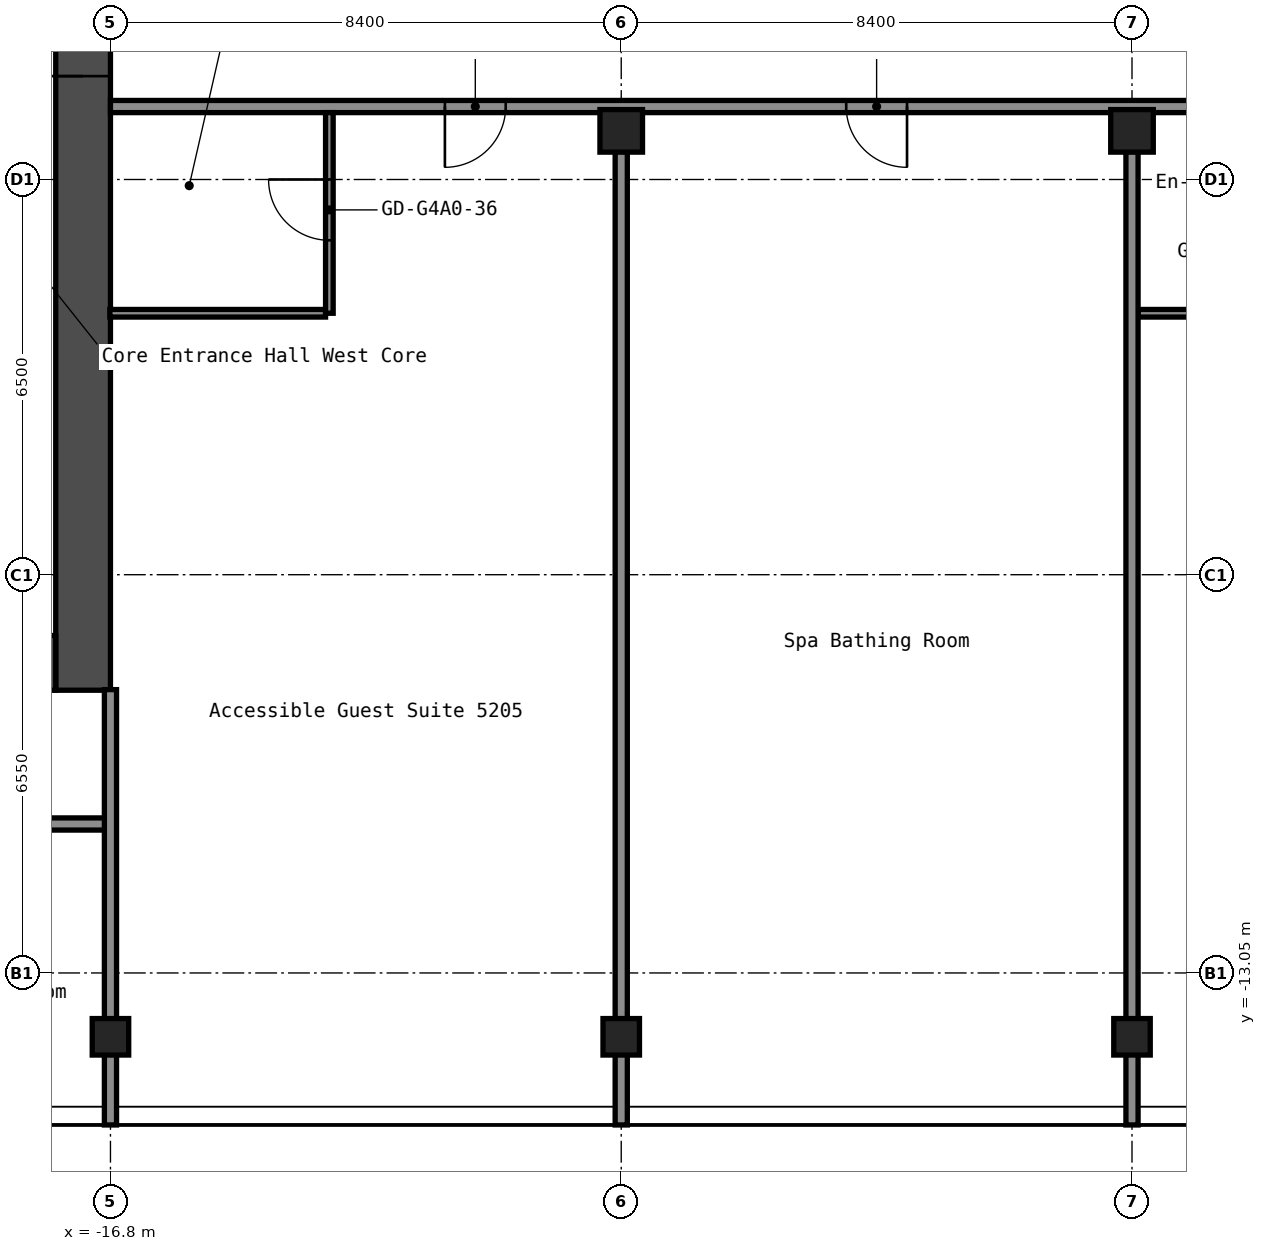
"""IFC4 building model, lengths in metres.
Left out: names, types, materials, properties, quantities, classifications, styles, units other than length and angle.
Written with IfcOpenShell. Run it as: python <this file> out.ifc"""

import sys

from ifc_helpers import new_model, si_unit, direction, frame, frame_2d, origin, origin_2d, place, context, subcontext, project, spatial, rectangle, hollow_rectangle, extrude, element, fill, save


model = new_model("IFC4")
c1 = context("Model", 3, precision=1e-05, world=origin(), true_north=direction((0.0, 1.0)))
c2 = subcontext(c1, "Body", "Model", "MODEL_VIEW")
j1 = project(units=[si_unit("LENGTHUNIT", "METRE"), si_unit("PLANEANGLEUNIT", "RADIAN")], contexts=[c1])
p1 = place(None, origin())
s1 = spatial("IfcSite", under=j1, at=p1, CompositionType="ELEMENT")
p2 = place(p1, origin())
s2 = spatial("IfcBuilding", under=s1, at=p2, CompositionType="ELEMENT")
p3 = place(p2, frame((0.0, 0.0, 186.6)))
s3 = spatial("IfcBuildingStorey", under=s2, at=p3, CompositionType="ELEMENT", Elevation=186.6)
for number, where, z_axis, x_axis in (
    (1, (-16.8, -14.1, 0.0), (0.0, 0.0, 1.0), (1.0, 0.0, 0.0)),
    (2, (-8.4, -14.1, 0.0), (0.0, 0.0, 1.0), (1.0, 0.0, 0.0)),
):
    element("IfcColumn", number, at=place(p3, frame(where, z_axis=z_axis, x_axis=x_axis)), inside=s3, PredefinedType="COLUMN", context=c2, shape_type="SweptSolid", body=[
        extrude(hollow_rectangle(XDim=0.6, YDim=0.6, WallThickness=0.025, InnerFilletRadius=0.038, OuterFilletRadius=0.062, at=origin_2d()), origin(), (0.0, 0.0, 1.0), 2.75),
    ])
p4 = place(p3, frame((-8.4, 0.8, 0.0), z_axis=(0.0, 0.0, 1.0), x_axis=(1.0, 0.0, 0.0)))
e3 = element("IfcColumn", 3, at=p4, inside=s3, PredefinedType="COLUMN", context=c2, shape_type="SweptSolid", body=[
    extrude(hollow_rectangle(XDim=0.7, YDim=0.7, WallThickness=0.028, at=origin_2d()), origin(), (0.0, 0.0, 1.0), 2.75),
])
p5 = place(p3, frame((0.0, -14.1, 0.0), z_axis=(0.0, 0.0, 1.0), x_axis=(1.0, 0.0, 0.0)))
e4 = element("IfcColumn", 4, at=p5, inside=s3, PredefinedType="COLUMN", context=c2, shape_type="SweptSolid", body=[
    extrude(hollow_rectangle(XDim=0.6, YDim=0.6, WallThickness=0.025, InnerFilletRadius=0.038, OuterFilletRadius=0.062, at=origin_2d()), origin(), (0.0, 0.0, 1.0), 2.75),
])
p6 = place(p3, frame((0.0, 0.8, 0.0), z_axis=(0.0, 0.0, 1.0), x_axis=(1.0, 0.0, 0.0)))
e5 = element("IfcColumn", 5, at=p6, inside=s3, PredefinedType="COLUMN", context=c2, shape_type="SweptSolid", body=[
    extrude(hollow_rectangle(XDim=0.7, YDim=0.7, WallThickness=0.028, at=origin_2d()), origin(), (0.0, 0.0, 1.0), 2.75),
])
p7 = place(p3, frame((-17.25, -8.4, 0.0), z_axis=(0.0, 0.0, 1.0), x_axis=(0.0, 1.0, 0.0)))
e6 = element("IfcWall", 6, at=p7, inside=s3, PredefinedType="SHEAR", context=c2, shape_type="SweptSolid", body=[
    extrude(rectangle(XDim=16.8, YDim=0.9, at=frame_2d((8.4, 0.0))), origin(), (0.0, 0.0, 1.0), 2.75),
])
p8 = place(p7, frame((10.1, 0.0, 0.0)))
e7 = element("IfcOpeningElement", 7, at=p8, cuts=e6, PredefinedType="OPENING", context=c2, shape_type="SweptSolid", body=[
    extrude(rectangle(XDim=1.6, YDim=2.1, at=frame_2d((0.8, 1.05))), frame((0.0, 0.46, 0.0), z_axis=(0.0, -1.0, 0.0), x_axis=(1.0, 0.0, 0.0)), (0.0, 0.0, 1.0), 0.92),
])
p9 = place(p3, frame((-32.7, -7.95, 0.0), z_axis=(0.0, 0.0, 1.0), x_axis=(1.0, 0.0, 0.0)))
e8 = element("IfcWall", 8, at=p9, inside=s3, PredefinedType="SHEAR", context=c2, shape_type="SweptSolid", body=[
    extrude(rectangle(XDim=15.0, YDim=0.9, at=frame_2d((7.5, 0.0))), origin(), (0.0, 0.0, 1.0), 2.75),
])
p10 = place(p9, frame((11.45, 0.0, 0.0)))
e9 = element("IfcOpeningElement", 9, at=p10, cuts=e8, PredefinedType="OPENING", context=c2, shape_type="SweptSolid", body=[
    extrude(rectangle(XDim=1.0, YDim=2.1, at=frame_2d((0.5, 1.05))), frame((0.0, 0.46, 0.0), z_axis=(0.0, -1.0, 0.0), x_axis=(1.0, 0.0, 0.0)), (0.0, 0.0, 1.0), 0.92),
])
p11 = place(p3, frame((-38.1, -10.6, 0.0), z_axis=(0.0, 0.0, 1.0), x_axis=(1.0, 0.0, 0.0)))
e10 = element("IfcWall", 10, at=p11, inside=s3, PredefinedType="PARTITIONING", context=c2, shape_type="SweptSolid", body=[
    extrude(rectangle(XDim=21.3, YDim=0.2, at=frame_2d((10.65, 0.0))), origin(), (0.0, 0.0, 1.0), 2.75),
])
p12 = place(p11, frame((1.95, 0.0, 0.0)))
e11 = element("IfcOpeningElement", 11, at=p12, cuts=e10, PredefinedType="OPENING", context=c2, shape_type="SweptSolid", body=[
    extrude(rectangle(XDim=0.9, YDim=2.1, at=frame_2d((0.45, 1.05))), frame((0.0, 0.11, 0.0), z_axis=(0.0, -1.0, 0.0), x_axis=(1.0, 0.0, 0.0)), (0.0, 0.0, 1.0), 0.22),
])
p13 = place(p11, frame((6.74, 0.0, 0.0)))
e12 = element("IfcOpeningElement", 12, at=p13, cuts=e10, PredefinedType="OPENING", context=c2, shape_type="SweptSolid", body=[
    extrude(rectangle(XDim=0.9, YDim=2.1, at=frame_2d((0.45, 1.05))), frame((0.0, 0.11, 0.0), z_axis=(0.0, -1.0, 0.0), x_axis=(1.0, 0.0, 0.0)), (0.0, 0.0, 1.0), 0.22),
])
p14 = place(p11, frame((10.94, 0.0, 0.0)))
e13 = element("IfcOpeningElement", 13, at=p14, cuts=e10, PredefinedType="OPENING", context=c2, shape_type="SweptSolid", body=[
    extrude(rectangle(XDim=0.9, YDim=2.1, at=frame_2d((0.45, 1.05))), frame((0.0, 0.11, 0.0), z_axis=(0.0, -1.0, 0.0), x_axis=(1.0, 0.0, 0.0)), (0.0, 0.0, 1.0), 0.22),
])
p15 = place(p11, frame((13.96, 0.0, 0.0)))
e14 = element("IfcOpeningElement", 14, at=p15, cuts=e10, PredefinedType="OPENING", context=c2, shape_type="SweptSolid", body=[
    extrude(rectangle(XDim=0.9, YDim=2.1, at=frame_2d((0.45, 1.05))), frame((0.0, 0.11, 0.0), z_axis=(0.0, -1.0, 0.0), x_axis=(1.0, 0.0, 0.0)), (0.0, 0.0, 1.0), 0.22),
])
p16 = place(p11, frame((18.16, 0.0, 0.0)))
e15 = element("IfcOpeningElement", 15, at=p16, cuts=e10, PredefinedType="OPENING", context=c2, shape_type="SweptSolid", body=[
    extrude(rectangle(XDim=0.9, YDim=2.1, at=frame_2d((0.45, 1.05))), frame((0.0, 0.11, 0.0), z_axis=(0.0, -1.0, 0.0), x_axis=(1.0, 0.0, 0.0)), (0.0, 0.0, 1.0), 0.22),
])
p17 = place(p3, frame((-16.81, -2.2, 0.0), z_axis=(0.0, 0.0, 1.0), x_axis=(1.0, 0.0, 0.0)))
e16 = element("IfcWall", 16, at=p17, inside=s3, PredefinedType="PARTITIONING", context=c2, shape_type="SweptSolid", body=[
    extrude(rectangle(XDim=3.548, YDim=0.125, at=frame_2d((1.774, 0.0))), origin(), (0.0, 0.0, 1.0), 2.75),
])
p18 = place(p3, frame((0.1, -2.2, 0.0), z_axis=(0.0, 0.0, 1.0), x_axis=(1.0, 0.0, 0.0)))
e17 = element("IfcWall", 17, at=p18, inside=s3, PredefinedType="PARTITIONING", context=c2, shape_type="SweptSolid", body=[
    extrude(rectangle(XDim=3.237, YDim=0.125, at=frame_2d((1.619, 0.0))), origin(), (0.0, 0.0, 1.0), 2.75),
])
p19 = place(p18, frame((1.2, 0.0, 0.0)))
e18 = element("IfcOpeningElement", 18, at=p19, cuts=e17, PredefinedType="OPENING", context=c2, shape_type="SweptSolid", body=[
    extrude(rectangle(XDim=0.8, YDim=2.1, at=frame_2d((0.4, 1.05))), frame((0.0, 0.073, 0.0), z_axis=(0.0, -1.0, 0.0), x_axis=(1.0, 0.0, 0.0)), (0.0, 0.0, 1.0), 0.145),
])
p20 = place(p3, frame((-16.8, 1.2, 0.0), z_axis=(0.0, 0.0, 1.0), x_axis=(1.0, 0.0, 0.0)))
e19 = element("IfcWall", 19, at=p20, inside=s3, PredefinedType="PARTITIONING", context=c2, shape_type="SweptSolid", body=[
    extrude(rectangle(XDim=33.6, YDim=0.2, at=frame_2d((16.8, 0.0))), origin(), (0.0, 0.0, 1.0), 2.75),
])
p21 = place(p20, frame((5.5, 0.0, 0.0)))
e20 = element("IfcOpeningElement", 20, at=p21, cuts=e19, PredefinedType="OPENING", context=c2, shape_type="SweptSolid", body=[
    extrude(rectangle(XDim=1.0, YDim=2.1, at=frame_2d((0.5, 1.05))), frame((0.0, 0.11, 0.0), z_axis=(0.0, -1.0, 0.0), x_axis=(1.0, 0.0, 0.0)), (0.0, 0.0, 1.0), 0.22),
])
p22 = place(p20, frame((12.1, 0.0, 0.0)))
e21 = element("IfcOpeningElement", 21, at=p22, cuts=e19, PredefinedType="OPENING", context=c2, shape_type="SweptSolid", body=[
    extrude(rectangle(XDim=1.0, YDim=2.1, at=frame_2d((0.5, 1.05))), frame((0.0, 0.11, 0.0), z_axis=(0.0, -1.0, 0.0), x_axis=(1.0, 0.0, 0.0)), (0.0, 0.0, 1.0), 0.22),
])
p23 = place(p20, frame((22.2, 0.0, 0.0)))
e22 = element("IfcOpeningElement", 22, at=p23, cuts=e19, PredefinedType="OPENING", context=c2, shape_type="SweptSolid", body=[
    extrude(rectangle(XDim=1.0, YDim=2.1, at=frame_2d((0.5, 1.05))), frame((0.0, 0.11, 0.0), z_axis=(0.0, -1.0, 0.0), x_axis=(1.0, 0.0, 0.0)), (0.0, 0.0, 1.0), 0.22),
])
p24 = place(p20, frame((30.6, 0.0, 0.0)))
e23 = element("IfcOpeningElement", 23, at=p24, cuts=e19, PredefinedType="OPENING", context=c2, shape_type="SweptSolid", body=[
    extrude(rectangle(XDim=1.0, YDim=2.1, at=frame_2d((0.5, 1.05))), frame((0.0, 0.11, 0.0), z_axis=(0.0, -1.0, 0.0), x_axis=(1.0, 0.0, 0.0)), (0.0, 0.0, 1.0), 0.22),
])
p25 = place(p3, frame((-16.8, -15.55, 0.0), z_axis=(0.0, 0.0, 1.0), x_axis=(0.0, 1.0, 0.0)))
e24 = element("IfcWall", 24, at=p25, inside=s3, PredefinedType="PARTITIONING", context=c2, shape_type="SweptSolid", body=[
    extrude(rectangle(XDim=7.16, YDim=0.2, at=frame_2d((3.58, 0.0))), origin(), (0.0, 0.0, 1.0), 2.75),
])
p26 = place(p3, frame((-13.2, -2.2, 0.0), z_axis=(0.0, 0.0, 1.0), x_axis=(0.0, 1.0, 0.0)))
e25 = element("IfcWall", 25, at=p26, inside=s3, PredefinedType="PARTITIONING", context=c2, shape_type="SweptSolid", body=[
    extrude(rectangle(XDim=3.3, YDim=0.125, at=frame_2d((1.65, 0.0))), origin(), (0.0, 0.0, 1.0), 2.75),
])
p27 = place(p26, frame((1.2, 0.0, 0.0)))
e26 = element("IfcOpeningElement", 26, at=p27, cuts=e25, PredefinedType="OPENING", context=c2, shape_type="SweptSolid", body=[
    extrude(rectangle(XDim=1.0, YDim=2.1, at=frame_2d((0.5, 1.05))), frame((0.0, 0.073, 0.0), z_axis=(0.0, -1.0, 0.0), x_axis=(1.0, 0.0, 0.0)), (0.0, 0.0, 1.0), 0.145),
])
for number, where, z_axis, x_axis in (
    (27, (-8.4, -15.55, 0.0), (0.0, 0.0, 1.0), (0.0, 1.0, 0.0)),
    (28, (0.0, -15.55, 0.0), (0.0, 0.0, 1.0), (0.0, 1.0, 0.0)),
):
    element("IfcWall", number, at=place(p3, frame(where, z_axis=z_axis, x_axis=x_axis)), inside=s3, PredefinedType="PARTITIONING", context=c2, shape_type="SweptSolid", body=[
        extrude(rectangle(XDim=16.01, YDim=0.2, at=frame_2d((8.005, 0.0))), origin(), (0.0, 0.0, 1.0), 2.75),
    ])
p28 = place(p8, origin())
e29 = element("IfcDoor", 29, at=p28, inside=s3, OperationType="DOUBLE_DOOR_SINGLE_SWING", PredefinedType="DOOR", context=c2, shape_type="SweptSolid", body=[
    extrude(rectangle(XDim=1.6, YDim=2.1, at=frame_2d((0.8, 1.05))), frame((0.0, 0.025, 0.0), z_axis=(0.0, -1.0, 0.0), x_axis=(1.0, 0.0, 0.0)), (0.0, 0.0, 1.0), 0.05),
])
fill(e7, e29)
p29 = place(p21, origin())
e30 = element("IfcDoor", 30, at=p29, inside=s3, OperationType="SINGLE_SWING_LEFT", PredefinedType="DOOR", context=c2, shape_type="SweptSolid", body=[
    extrude(rectangle(XDim=1.0, YDim=2.1, at=frame_2d((0.5, 1.05))), frame((0.0, 0.025, 0.0), z_axis=(0.0, -1.0, 0.0), x_axis=(1.0, 0.0, 0.0)), (0.0, 0.0, 1.0), 0.05),
])
fill(e20, e30)
p30 = place(p22, origin())
e31 = element("IfcDoor", 31, at=p30, inside=s3, OperationType="SINGLE_SWING_RIGHT", PredefinedType="DOOR", context=c2, shape_type="SweptSolid", body=[
    extrude(rectangle(XDim=1.0, YDim=2.1, at=frame_2d((0.5, 1.05))), frame((0.0, 0.025, 0.0), z_axis=(0.0, -1.0, 0.0), x_axis=(1.0, 0.0, 0.0)), (0.0, 0.0, 1.0), 0.05),
])
fill(e21, e31)
p31 = place(p27, origin())
e32 = element("IfcDoor", 32, at=p31, inside=s3, OperationType="SINGLE_SWING_LEFT", PredefinedType="DOOR", context=c2, shape_type="SweptSolid", body=[
    extrude(rectangle(XDim=1.0, YDim=2.1, at=frame_2d((0.5, 1.05))), frame((0.0, 0.025, 0.0), z_axis=(0.0, -1.0, 0.0), x_axis=(1.0, 0.0, 0.0)), (0.0, 0.0, 1.0), 0.05),
])
fill(e26, e32)
save(model, sys.argv[1])
